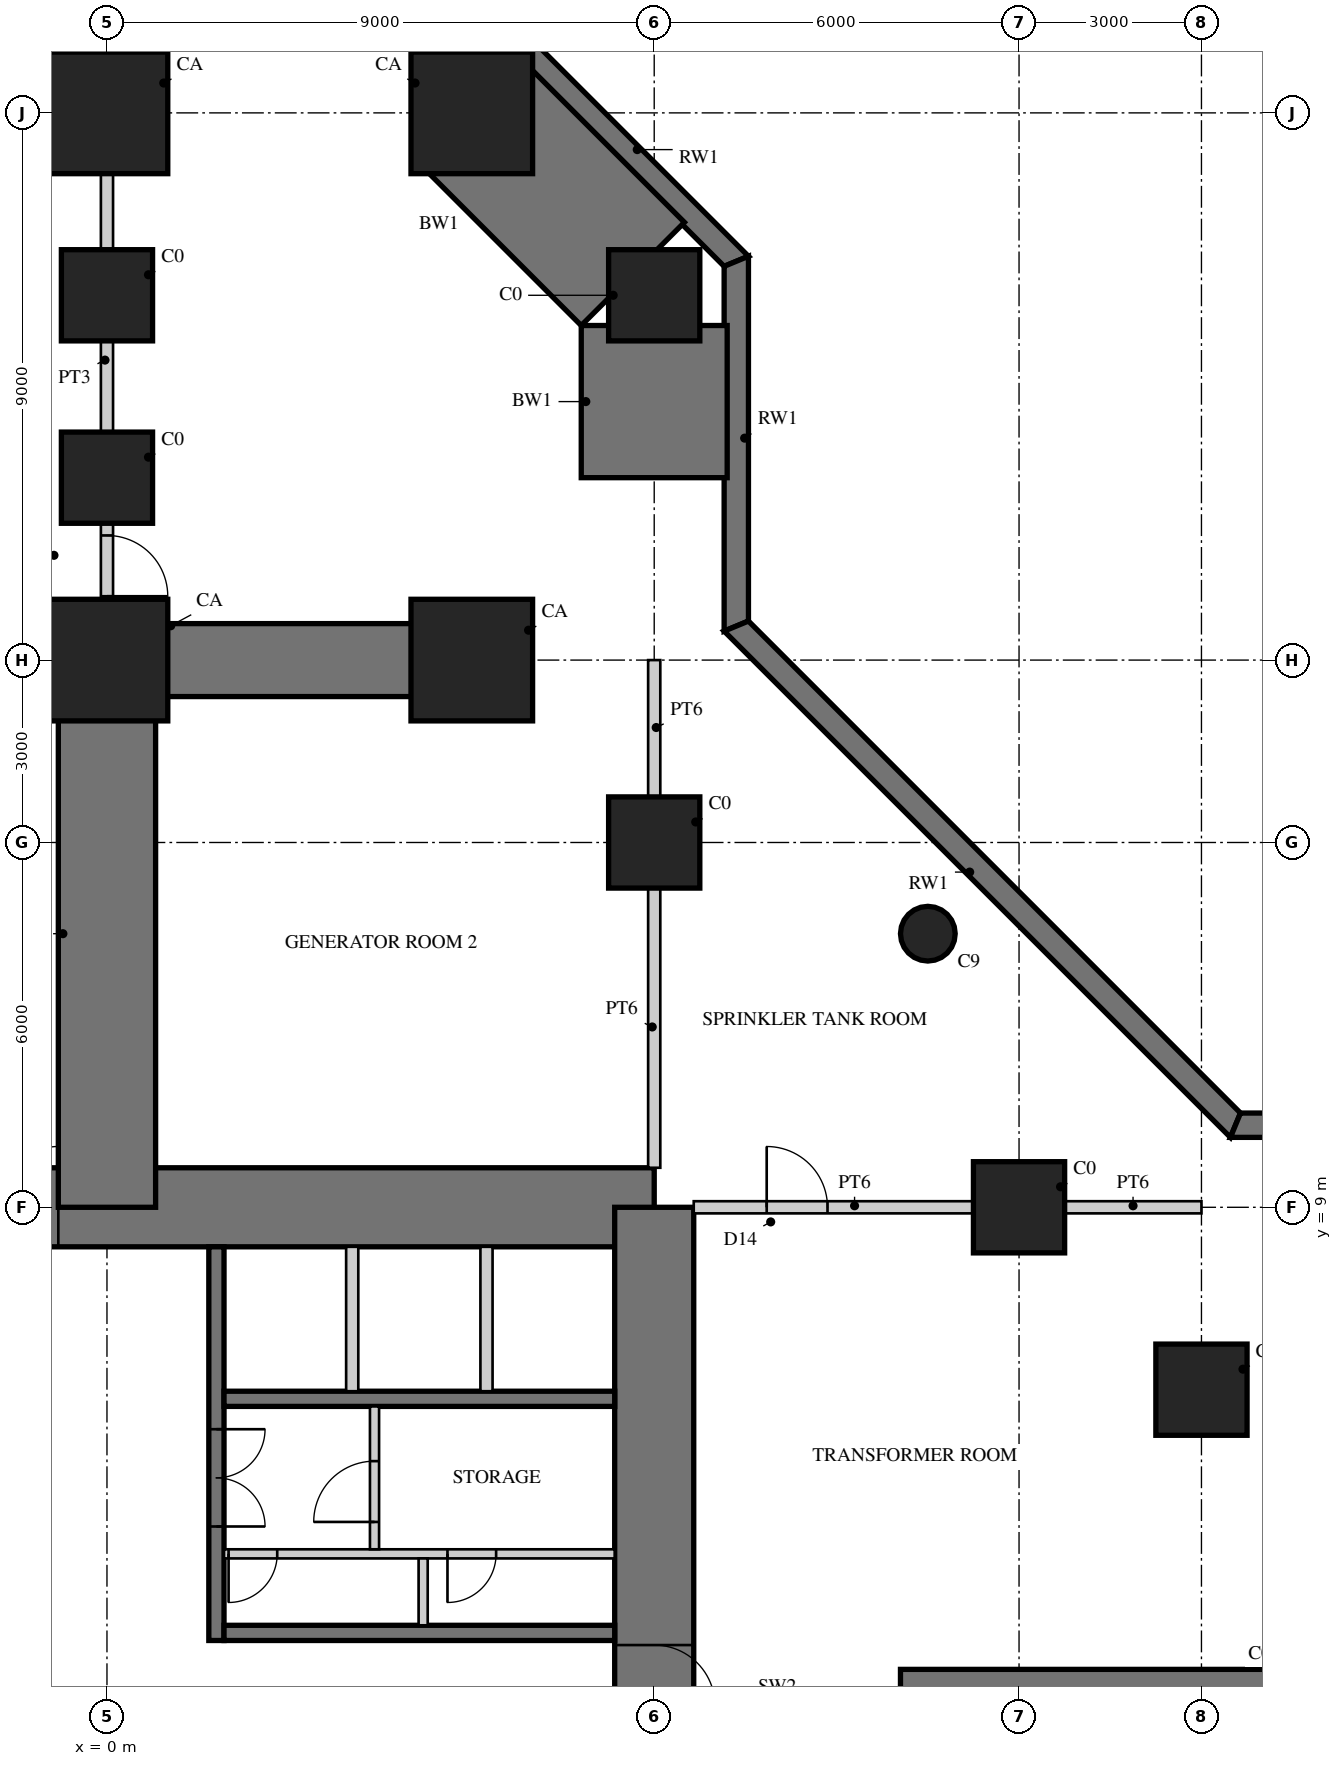
"""IFC4 building model, lengths in metres.
Left out: names, types, materials, properties, quantities, classifications, styles, units other than length and angle.
Written with IfcOpenShell. Run it as: python <this file> out.ifc"""

import sys

from ifc_helpers import new_model, si_unit, direction, frame, frame_2d, origin, origin_2d, place, context, subcontext, project, spatial, polyline, rectangle, circle, outline, extrude, element, fill, save


model = new_model("IFC4")
c1 = context("Model", 3, precision=1e-05, world=origin(), true_north=direction((0.0, 1.0)))
c2 = subcontext(c1, "Body", "Model", "MODEL_VIEW")
j1 = project(units=[si_unit("LENGTHUNIT", "METRE"), si_unit("PLANEANGLEUNIT", "RADIAN")], contexts=[c1])
p1 = place(None, origin())
s1 = spatial("IfcSite", under=j1, at=p1, CompositionType="ELEMENT")
p2 = place(p1, origin())
s2 = spatial("IfcBuilding", under=s1, at=p2, CompositionType="ELEMENT")
p3 = place(p2, frame((0.0, 0.0, -8.0)))
s3 = spatial("IfcBuildingStorey", under=s2, at=p3, CompositionType="ELEMENT", Elevation=-8.0)
p4 = place(p3, origin())
e1 = element("IfcWall", 1, at=p4, inside=s3, PredefinedType="SOLIDWALL", context=c2, shape_type="SweptSolid", body=[
    extrude(outline(polyline([(6.476, 28.15), (6.642, 28.55), (10.55, 24.642), (10.15, 24.476), (6.476, 28.15)])), origin(), (0.0, 0.0, 1.0), 4.0),
])
p5 = place(p3, origin())
e2 = element("IfcWall", 2, at=p5, inside=s3, PredefinedType="SOLIDWALL", context=c2, shape_type="SweptSolid", body=[
    extrude(outline(polyline([(10.15, 24.476), (10.55, 24.642), (10.55, 18.642), (10.15, 18.476), (10.15, 24.476)])), origin(), (0.0, 0.0, 1.0), 4.0),
])
p6 = place(p3, origin())
e3 = element("IfcWall", 3, at=p6, inside=s3, PredefinedType="SOLIDWALL", context=c2, shape_type="SweptSolid", body=[
    extrude(outline(polyline([(10.15, 18.476), (10.55, 18.642), (18.642, 10.55), (18.476, 10.15), (10.15, 18.476)])), origin(), (0.0, 0.0, 1.0), 4.0),
])
p7 = place(p3, origin())
e4 = element("IfcWall", 4, at=p7, inside=s3, PredefinedType="SOLIDWALL", context=c2, shape_type="SweptSolid", body=[
    extrude(outline(polyline([(18.476, 10.15), (18.642, 10.55), (24.642, 10.55), (24.476, 10.15), (18.476, 10.15)])), origin(), (0.0, 0.0, 1.0), 4.0),
])
p8 = place(p3, frame((9.0, 9.0, 0.0), z_axis=(0.0, 0.0, 1.0), x_axis=(-1.0, 0.0, 0.0)))
e5 = element("IfcWall", 5, at=p8, inside=s3, PredefinedType="SHEAR", context=c2, shape_type="SweptSolid", body=[
    extrude(rectangle(XDim=18.0, YDim=1.3, at=frame_2d((9.0, 0.0))), origin(), (0.0, 0.0, 1.0), 4.0),
])
p9 = place(p8, frame((9.8, 0.0, 0.0)))
e6 = element("IfcOpeningElement", 6, at=p9, cuts=e5, PredefinedType="OPENING", context=c2, shape_type="SweptSolid", body=[
    extrude(rectangle(XDim=1.0, YDim=2.4, at=frame_2d((0.5, 1.2))), frame((0.0, 0.66, 0.0), z_axis=(0.0, -1.0, 0.0), x_axis=(1.0, 0.0, 0.0)), (0.0, 0.0, 1.0), 1.32),
])
p10 = place(p3, frame((9.0, -9.0, 0.0), z_axis=(0.0, 0.0, 1.0), x_axis=(0.0, 1.0, 0.0)))
e7 = element("IfcWall", 7, at=p10, inside=s3, PredefinedType="SHEAR", context=c2, shape_type="SweptSolid", body=[
    extrude(rectangle(XDim=18.0, YDim=1.3, at=frame_2d((9.0, 0.0))), origin(), (0.0, 0.0, 1.0), 4.0),
])
p11 = place(p10, frame((9.8, 0.0, 0.0)))
e8 = element("IfcOpeningElement", 8, at=p11, cuts=e7, PredefinedType="OPENING", context=c2, shape_type="SweptSolid", body=[
    extrude(rectangle(XDim=1.0, YDim=2.4, at=frame_2d((0.5, 1.2))), frame((0.0, 0.66, 0.0), z_axis=(0.0, -1.0, 0.0), x_axis=(1.0, 0.0, 0.0)), (0.0, 0.0, 1.0), 1.32),
])
p12 = place(p3, frame((1.8, 1.875, 0.0), z_axis=(0.0, 0.0, 1.0), x_axis=(0.0, 1.0, 0.0)))
e9 = element("IfcWall", 9, at=p12, inside=s3, PredefinedType="SHEAR", context=c2, shape_type="SweptSolid", body=[
    extrude(rectangle(XDim=6.475, YDim=0.25, at=frame_2d((3.238, 0.0))), origin(), (0.0, 0.0, 1.0), 4.0),
])
p13 = place(p12, frame((1.875, 0.0, 0.0)))
e10 = element("IfcOpeningElement", 10, at=p13, cuts=e9, PredefinedType="OPENING", context=c2, shape_type="SweptSolid", body=[
    extrude(rectangle(XDim=1.6, YDim=2.4, at=frame_2d((0.8, 1.2))), frame((0.0, 0.135, 0.0), z_axis=(0.0, -1.0, 0.0), x_axis=(1.0, 0.0, 0.0)), (0.0, 0.0, 1.0), 0.27),
])
for number, where, z_axis, x_axis in (
    (11, (1.925, 2.0, 0.0), (0.0, 0.0, 1.0), (1.0, 0.0, 0.0)),
    (12, (1.925, 5.85, 0.0), (0.0, 0.0, 1.0), (1.0, 0.0, 0.0)),
):
    element("IfcWall", number, at=place(p3, frame(where, z_axis=z_axis, x_axis=x_axis)), inside=s3, PredefinedType="SHEAR", context=c2, shape_type="SweptSolid", body=[
        extrude(rectangle(XDim=6.425, YDim=0.25, at=frame_2d((3.212, 0.0))), origin(), (0.0, 0.0, 1.0), 4.0),
    ])
p14 = place(p3, frame((1.925, 3.3, 0.0), z_axis=(0.0, 0.0, 1.0), x_axis=(1.0, 0.0, 0.0)))
e13 = element("IfcWall", 13, at=p14, inside=s3, PredefinedType="PARTITIONING", context=c2, shape_type="SweptSolid", body=[
    extrude(rectangle(XDim=6.425, YDim=0.15, at=frame_2d((3.212, 0.0))), origin(), (0.0, 0.0, 1.0), 4.0),
])
p15 = place(p14, frame((0.075, 0.0, 0.0)))
e14 = element("IfcOpeningElement", 14, at=p15, cuts=e13, PredefinedType="OPENING", context=c2, shape_type="SweptSolid", body=[
    extrude(rectangle(XDim=0.8, YDim=2.1, at=frame_2d((0.4, 1.05))), frame((0.0, 0.085, 0.0), z_axis=(0.0, -1.0, 0.0), x_axis=(1.0, 0.0, 0.0)), (0.0, 0.0, 1.0), 0.17),
])
p16 = place(p14, frame((3.675, 0.0, 0.0)))
e15 = element("IfcOpeningElement", 15, at=p16, cuts=e13, PredefinedType="OPENING", context=c2, shape_type="SweptSolid", body=[
    extrude(rectangle(XDim=0.8, YDim=2.1, at=frame_2d((0.4, 1.05))), frame((0.0, 0.085, 0.0), z_axis=(0.0, -1.0, 0.0), x_axis=(1.0, 0.0, 0.0)), (0.0, 0.0, 1.0), 0.17),
])
p17 = place(p3, frame((5.2, 2.125, 0.0), z_axis=(0.0, 0.0, 1.0), x_axis=(0.0, 1.0, 0.0)))
e16 = element("IfcWall", 16, at=p17, inside=s3, PredefinedType="PARTITIONING", context=c2, shape_type="SweptSolid", body=[
    extrude(rectangle(XDim=1.1, YDim=0.15, at=frame_2d((0.55, 0.0))), origin(), (0.0, 0.0, 1.0), 4.0),
])
for number, where, z_axis, x_axis in (
    (17, (4.033, 5.975, 0.0), (0.0, 0.0, 1.0), (0.0, 1.0, 0.0)),
    (18, (6.242, 5.975, 0.0), (0.0, 0.0, 1.0), (0.0, 1.0, 0.0)),
):
    element("IfcWall", number, at=place(p3, frame(where, z_axis=z_axis, x_axis=x_axis)), inside=s3, PredefinedType="PARTITIONING", context=c2, shape_type="SweptSolid", body=[
        extrude(rectangle(XDim=2.375, YDim=0.2, at=frame_2d((1.188, 0.0))), origin(), (0.0, 0.0, 1.0), 4.0),
    ])
p18 = place(p3, frame((0.0, 9.0, 0.0), z_axis=(0.0, 0.0, 1.0), x_axis=(0.0, 1.0, 0.0)))
e19 = element("IfcWall", 19, at=p18, inside=s3, PredefinedType="SHEAR", context=c2, shape_type="SweptSolid", body=[
    extrude(rectangle(XDim=9.0, YDim=1.6, at=frame_2d((4.5, 0.0))), origin(), (0.0, 0.0, 1.0), 4.0),
])
for number, where, z_axis, x_axis in (
    (20, (0.0, 18.0, 0.0), (0.0, 0.0, 1.0), (-1.0, 0.0, 0.0)),
    (21, (0.0, 18.0, 0.0), (0.0, 0.0, 1.0), (1.0, 0.0, 0.0)),
):
    element("IfcWall", number, at=place(p3, frame(where, z_axis=z_axis, x_axis=x_axis)), inside=s3, PredefinedType="SHEAR", context=c2, shape_type="SweptSolid", body=[
        extrude(rectangle(XDim=6.0, YDim=1.2, at=frame_2d((3.0, 0.0))), origin(), (0.0, 0.0, 1.0), 4.0),
    ])
p19 = place(p3, frame((9.0, 21.0, 0.0), z_axis=(0.0, 0.0, 1.0), x_axis=(0.0, 1.0, 0.0)))
e22 = element("IfcWall", 22, at=p19, inside=s3, PredefinedType="SHEAR", context=c2, shape_type="SweptSolid", body=[
    extrude(rectangle(XDim=2.503, YDim=2.4, at=frame_2d((1.251, 0.0))), origin(), (0.0, 0.0, 1.0), 4.0),
])
p20 = place(p3, frame((8.648, 24.352, 0.0), z_axis=(0.0, 0.0, 1.0), x_axis=(-0.707106781187, 0.707106781187, 0.0)))
e23 = element("IfcWall", 23, at=p20, inside=s3, PredefinedType="SHEAR", context=c2, shape_type="SweptSolid", body=[
    extrude(rectangle(XDim=3.745, YDim=2.4, at=frame_2d((1.873, 0.0))), origin(), (0.0, 0.0, 1.0), 4.0),
])
p21 = place(p3, frame((13.05, 0.0, 0.0), z_axis=(0.0, 0.0, 1.0), x_axis=(1.0, 0.0, 0.0)))
e24 = element("IfcWall", 24, at=p21, inside=s3, PredefinedType="SHEAR", context=c2, shape_type="SweptSolid", body=[
    extrude(rectangle(XDim=13.95, YDim=2.8, at=frame_2d((6.975, 0.0))), origin(), (0.0, 0.0, 1.0), 4.0),
])
p22 = place(p21, frame((6.0, 0.0, 0.0)))
e25 = element("IfcOpeningElement", 25, at=p22, cuts=e24, PredefinedType="OPENING", context=c2, shape_type="SweptSolid", body=[
    extrude(rectangle(XDim=1.0, YDim=2.2, at=frame_2d((0.5, 1.1))), frame((0.0, 1.41, 0.0), z_axis=(0.0, -1.0, 0.0), x_axis=(1.0, 0.0, 0.0)), (0.0, 0.0, 1.0), 2.82),
])
for number, where, z_axis, x_axis in (
    (26, (9.0, 15.0, 0.0), (0.0, 0.0, 1.0), (1.0, 0.0, 0.0)),
    (27, (9.0, 24.0, 0.0), (0.0, 0.0, 1.0), (1.0, 0.0, 0.0)),
):
    element("IfcColumn", number, at=place(p3, frame(where, z_axis=z_axis, x_axis=x_axis)), inside=s3, PredefinedType="COLUMN", context=c2, shape_type="SweptSolid", body=[
        extrude(rectangle(XDim=1.5, YDim=1.5, at=origin_2d()), origin(), (0.0, 0.0, 1.0), 4.0),
    ])
for number, where, z_axis, x_axis in (
    (28, (6.0, 27.0, 0.0), (0.0, 0.0, 1.0), (1.0, 0.0, 0.0)),
    (29, (0.0, 27.0, 0.0), (0.0, 0.0, 1.0), (1.0, 0.0, 0.0)),
):
    element("IfcColumn", number, at=place(p3, frame(where, z_axis=z_axis, x_axis=x_axis)), inside=s3, PredefinedType="COLUMN", context=c2, shape_type="SweptSolid", body=[
        extrude(rectangle(XDim=2.0, YDim=2.0, at=origin_2d()), origin(), (0.0, 0.0, 1.0), 4.0),
    ])
p23 = place(p3, frame((15.0, 9.0, 0.0), z_axis=(0.0, 0.0, 1.0), x_axis=(1.0, 0.0, 0.0)))
e30 = element("IfcColumn", 30, at=p23, inside=s3, PredefinedType="COLUMN", context=c2, shape_type="SweptSolid", body=[
    extrude(rectangle(XDim=1.5, YDim=1.5, at=origin_2d()), origin(), (0.0, 0.0, 1.0), 4.0),
])
for number, where, z_axis, x_axis in (
    (31, (6.0, 18.0, 0.0), (0.0, 0.0, 1.0), (1.0, 0.0, 0.0)),
    (32, (0.0, 18.0, 0.0), (0.0, 0.0, 1.0), (1.0, 0.0, 0.0)),
):
    element("IfcColumn", number, at=place(p3, frame(where, z_axis=z_axis, x_axis=x_axis)), inside=s3, PredefinedType="COLUMN", context=c2, shape_type="SweptSolid", body=[
        extrude(rectangle(XDim=2.0, YDim=2.0, at=origin_2d()), origin(), (0.0, 0.0, 1.0), 4.0),
    ])
for number, where, z_axis, x_axis in (
    (33, (0.0, 21.0, 0.0), (0.0, 0.0, 1.0), (1.0, 0.0, 0.0)),
    (34, (0.0, 24.0, 0.0), (0.0, 0.0, 1.0), (1.0, 0.0, 0.0)),
    (35, (18.0, 6.0, 0.0), (0.0, 0.0, 1.0), (1.0, 0.0, 0.0)),
):
    element("IfcColumn", number, at=place(p3, frame(where, z_axis=z_axis, x_axis=x_axis)), inside=s3, PredefinedType="COLUMN", context=c2, shape_type="SweptSolid", body=[
        extrude(rectangle(XDim=1.5, YDim=1.5, at=origin_2d()), origin(), (0.0, 0.0, 1.0), 4.0),
    ])
p24 = place(p3, frame((13.5, 13.5, 0.0), z_axis=(0.0, 0.0, 1.0), x_axis=(1.0, 0.0, 0.0)))
e36 = element("IfcColumn", 36, at=p24, inside=s3, PredefinedType="COLUMN", context=c2, shape_type="SweptSolid", body=[
    extrude(circle(Radius=0.45, at=origin_2d()), origin(), (0.0, 0.0, 1.0), 4.0),
])
p25 = place(p3, frame((4.4, 3.375, 0.0), z_axis=(0.0, 0.0, 1.0), x_axis=(0.0, 1.0, 0.0)))
e37 = element("IfcWall", 37, at=p25, inside=s3, PredefinedType="PARTITIONING", context=c2, shape_type="SweptSolid", body=[
    extrude(rectangle(XDim=2.35, YDim=0.15, at=frame_2d((1.175, 0.0))), origin(), (0.0, 0.0, 1.0), 3.75),
])
p26 = place(p25, frame((0.45, 0.0, 0.0)))
e38 = element("IfcOpeningElement", 38, at=p26, cuts=e37, PredefinedType="OPENING", context=c2, shape_type="SweptSolid", body=[
    extrude(rectangle(XDim=1.0, YDim=2.1, at=frame_2d((0.5, 1.05))), frame((0.0, 0.085, 0.0), z_axis=(0.0, -1.0, 0.0), x_axis=(1.0, 0.0, 0.0)), (0.0, 0.0, 1.0), 0.17),
])
p27 = place(p3, frame((9.65, 9.0, 0.0), z_axis=(0.0, 0.0, 1.0), x_axis=(1.0, 0.0, 0.0)))
e39 = element("IfcWall", 39, at=p27, inside=s3, PredefinedType="SOLIDWALL", context=c2, shape_type="SweptSolid", body=[
    extrude(rectangle(XDim=4.6, YDim=0.2, at=frame_2d((2.3, 0.0))), origin(), (0.0, 0.0, 1.0), 2.75),
])
p28 = place(p27, frame((1.2, 0.0, 0.0)))
e40 = element("IfcOpeningElement", 40, at=p28, cuts=e39, PredefinedType="OPENING", context=c2, shape_type="SweptSolid", body=[
    extrude(rectangle(XDim=1.0, YDim=2.2, at=frame_2d((0.5, 1.1))), frame((0.0, 0.11, 0.0), z_axis=(0.0, -1.0, 0.0), x_axis=(1.0, 0.0, 0.0)), (0.0, 0.0, 1.0), 0.22),
])
p29 = place(p3, frame((15.75, 9.0, 0.0), z_axis=(0.0, 0.0, 1.0), x_axis=(1.0, 0.0, 0.0)))
e41 = element("IfcWall", 41, at=p29, inside=s3, PredefinedType="SOLIDWALL", context=c2, shape_type="SweptSolid", body=[
    extrude(rectangle(XDim=2.25, YDim=0.2, at=frame_2d((1.125, 0.0))), origin(), (0.0, 0.0, 1.0), 2.75),
])
p30 = place(p3, frame((9.0, 14.25, 0.0), z_axis=(0.0, 0.0, 1.0), x_axis=(0.0, -1.0, 0.0)))
e42 = element("IfcWall", 42, at=p30, inside=s3, PredefinedType="SOLIDWALL", context=c2, shape_type="SweptSolid", body=[
    extrude(rectangle(XDim=4.6, YDim=0.2, at=frame_2d((2.3, 0.0))), origin(), (0.0, 0.0, 1.0), 2.75),
])
p31 = place(p3, frame((9.0, 18.0, 0.0), z_axis=(0.0, 0.0, 1.0), x_axis=(0.0, -1.0, 0.0)))
e43 = element("IfcWall", 43, at=p31, inside=s3, PredefinedType="SOLIDWALL", context=c2, shape_type="SweptSolid", body=[
    extrude(rectangle(XDim=2.25, YDim=0.2, at=frame_2d((1.125, 0.0))), origin(), (0.0, 0.0, 1.0), 2.75),
])
p32 = place(p3, frame((0.0, 18.0, 0.0), z_axis=(0.0, 0.0, 1.0), x_axis=(0.0, 1.0, 0.0)))
e44 = element("IfcWall", 44, at=p32, inside=s3, PredefinedType="SOLIDWALL", context=c2, shape_type="SweptSolid", body=[
    extrude(rectangle(XDim=3.0, YDim=0.2, at=frame_2d((1.5, 0.0))), origin(), (0.0, 0.0, 1.0), 3.75),
])
p33 = place(p32, frame((1.05, 0.0, 0.0)))
e45 = element("IfcOpeningElement", 45, at=p33, cuts=e44, PredefinedType="OPENING", context=c2, shape_type="SweptSolid", body=[
    extrude(rectangle(XDim=1.0, YDim=2.2, at=frame_2d((0.5, 1.1))), frame((0.0, 0.11, 0.0), z_axis=(0.0, -1.0, 0.0), x_axis=(1.0, 0.0, 0.0)), (0.0, 0.0, 1.0), 0.22),
])
p34 = place(p3, frame((0.0, 21.0, 0.0), z_axis=(0.0, 0.0, 1.0), x_axis=(0.0, 1.0, 0.0)))
e46 = element("IfcWall", 46, at=p34, inside=s3, PredefinedType="SOLIDWALL", context=c2, shape_type="SweptSolid", body=[
    extrude(rectangle(XDim=6.0, YDim=0.2, at=frame_2d((3.0, 0.0))), origin(), (0.0, 0.0, 1.0), 2.75),
])
p35 = place(p26, origin())
e47 = element("IfcDoor", 47, at=p35, inside=s3, OperationType="SINGLE_SWING_LEFT", PredefinedType="DOOR", context=c2, shape_type="SweptSolid", body=[
    extrude(rectangle(XDim=1.0, YDim=2.1, at=frame_2d((0.5, 1.05))), frame((0.0, 0.025, 0.0), z_axis=(0.0, -1.0, 0.0), x_axis=(1.0, 0.0, 0.0)), (0.0, 0.0, 1.0), 0.05),
])
fill(e38, e47)
p36 = place(p28, origin())
e48 = element("IfcDoor", 48, at=p36, inside=s3, OperationType="SINGLE_SWING_LEFT", PredefinedType="DOOR", context=c2, shape_type="SweptSolid", body=[
    extrude(rectangle(XDim=1.0, YDim=2.2, at=frame_2d((0.5, 1.1))), frame((0.0, 0.025, 0.0), z_axis=(0.0, -1.0, 0.0), x_axis=(1.0, 0.0, 0.0)), (0.0, 0.0, 1.0), 0.05),
])
fill(e40, e48)
p37 = place(p33, frame((1.0, 0.0, 0.0), z_axis=(0.0, 0.0, 1.0), x_axis=(-1.0, 0.0, 0.0)))
e49 = element("IfcDoor", 49, at=p37, inside=s3, OperationType="SINGLE_SWING_RIGHT", PredefinedType="DOOR", context=c2, shape_type="SweptSolid", body=[
    extrude(rectangle(XDim=1.0, YDim=2.2, at=frame_2d((0.5, 1.1))), frame((0.0, 0.025, 0.0), z_axis=(0.0, -1.0, 0.0), x_axis=(1.0, 0.0, 0.0)), (0.0, 0.0, 1.0), 0.05),
])
fill(e45, e49)
p38 = place(p9, frame((1.0, 0.0, 0.0), z_axis=(0.0, 0.0, 1.0), x_axis=(-1.0, 0.0, 0.0)))
e50 = element("IfcDoor", 50, at=p38, inside=s3, OperationType="SINGLE_SWING_RIGHT", PredefinedType="DOOR", context=c2, shape_type="SweptSolid", body=[
    extrude(rectangle(XDim=1.0, YDim=2.4, at=frame_2d((0.5, 1.2))), frame((0.0, -0.005, 0.0), z_axis=(0.0, -1.0, 0.0), x_axis=(1.0, 0.0, 0.0)), (0.0, 0.0, 1.0), 0.05),
])
fill(e6, e50)
p39 = place(p11, frame((1.0, 0.0, 0.0), z_axis=(0.0, 0.0, 1.0), x_axis=(-1.0, 0.0, 0.0)))
e51 = element("IfcDoor", 51, at=p39, inside=s3, OperationType="SINGLE_SWING_RIGHT", PredefinedType="DOOR", context=c2, shape_type="SweptSolid", body=[
    extrude(rectangle(XDim=1.0, YDim=2.4, at=frame_2d((0.5, 1.2))), frame((0.0, -0.005, 0.0), z_axis=(0.0, -1.0, 0.0), x_axis=(1.0, 0.0, 0.0)), (0.0, 0.0, 1.0), 0.05),
])
fill(e8, e51)
p40 = place(p13, frame((1.6, 0.0, 0.0), z_axis=(0.0, 0.0, 1.0), x_axis=(-1.0, 0.0, 0.0)))
e52 = element("IfcDoor", 52, at=p40, inside=s3, OperationType="DOUBLE_DOOR_SINGLE_SWING", PredefinedType="DOOR", context=c2, shape_type="SweptSolid", body=[
    extrude(rectangle(XDim=1.6, YDim=2.4, at=frame_2d((0.8, 1.2))), frame((0.0, 0.025, 0.0), z_axis=(0.0, -1.0, 0.0), x_axis=(1.0, 0.0, 0.0)), (0.0, 0.0, 1.0), 0.05),
])
fill(e10, e52)
p41 = place(p15, frame((0.8, 0.0, 0.0), z_axis=(0.0, 0.0, 1.0), x_axis=(-1.0, 0.0, 0.0)))
e53 = element("IfcDoor", 53, at=p41, inside=s3, OperationType="SINGLE_SWING_RIGHT", PredefinedType="DOOR", context=c2, shape_type="SweptSolid", body=[
    extrude(rectangle(XDim=0.8, YDim=2.1, at=frame_2d((0.4, 1.05))), frame((0.0, 0.025, 0.0), z_axis=(0.0, -1.0, 0.0), x_axis=(1.0, 0.0, 0.0)), (0.0, 0.0, 1.0), 0.05),
])
fill(e14, e53)
p42 = place(p16, frame((0.8, 0.0, 0.0), z_axis=(0.0, 0.0, 1.0), x_axis=(-1.0, 0.0, 0.0)))
e54 = element("IfcDoor", 54, at=p42, inside=s3, OperationType="SINGLE_SWING_RIGHT", PredefinedType="DOOR", context=c2, shape_type="SweptSolid", body=[
    extrude(rectangle(XDim=0.8, YDim=2.1, at=frame_2d((0.4, 1.05))), frame((0.0, 0.025, 0.0), z_axis=(0.0, -1.0, 0.0), x_axis=(1.0, 0.0, 0.0)), (0.0, 0.0, 1.0), 0.05),
])
fill(e15, e54)
save(model, sys.argv[1])
